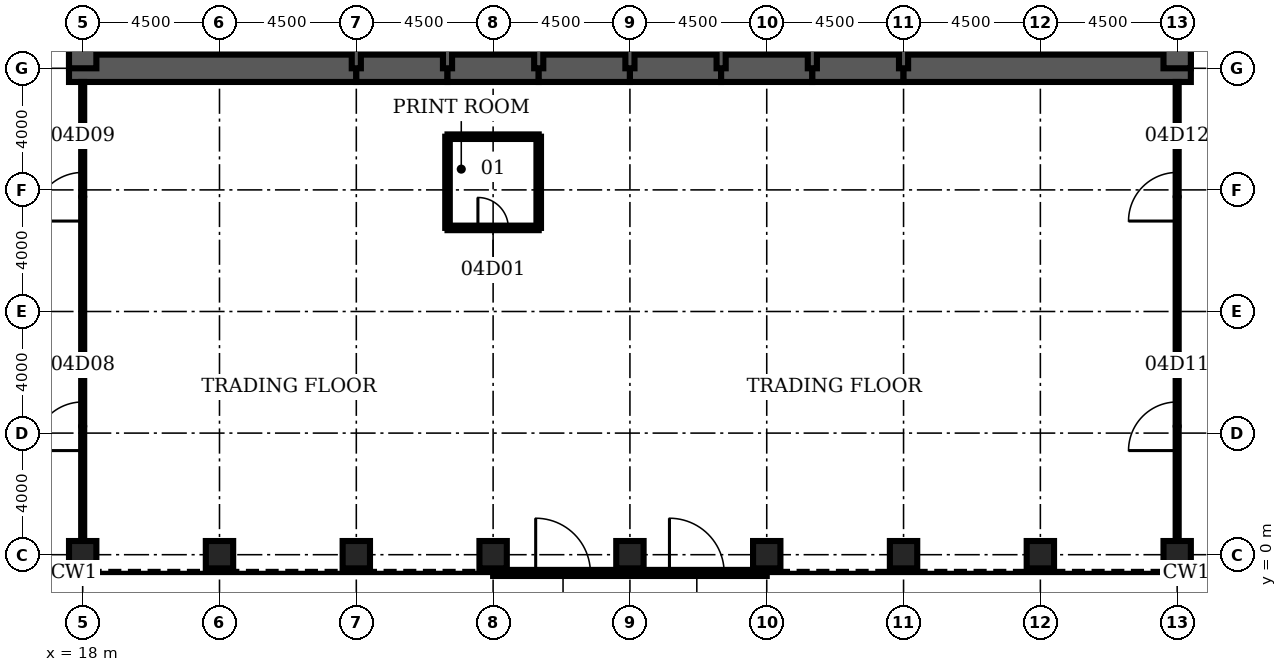
"""IFC4 building model, lengths in metres.
Left out: names, types, materials, properties, quantities, classifications, styles, units other than length and angle.
Written with IfcOpenShell. Run it as: python <this file> out.ifc"""

import sys

from ifc_helpers import new_model, si_unit, direction, frame, frame_2d, origin, origin_2d, place, context, subcontext, project, spatial, rectangle, hollow_rectangle, extrude, element, fill, save


model = new_model("IFC4")
c1 = context("Model", 3, precision=1e-05, world=origin(), true_north=direction((0.0, 1.0)))
c2 = subcontext(c1, "Body", "Model", "MODEL_VIEW")
j1 = project(units=[si_unit("LENGTHUNIT", "METRE"), si_unit("PLANEANGLEUNIT", "RADIAN")], contexts=[c1])
p1 = place(None, origin())
s1 = spatial("IfcSite", under=j1, at=p1, CompositionType="ELEMENT")
p2 = place(p1, origin())
s2 = spatial("IfcBuilding", under=s1, at=p2, CompositionType="ELEMENT")
p3 = place(p2, frame((0.0, 0.0, 23.0)))
s3 = spatial("IfcBuildingStorey", under=s2, at=p3, CompositionType="ELEMENT", Elevation=23.0)
for number, where, z_axis, x_axis in (
    (1, (18.0, 0.0, 0.0), (0.0, 0.0, 1.0), (0.0, 1.0, 0.0)),
    (2, (22.5, 0.0, 0.0), (0.0, 0.0, 1.0), (0.0, 1.0, 0.0)),
    (3, (27.0, 0.0, 0.0), (0.0, 0.0, 1.0), (0.0, 1.0, 0.0)),
    (4, (31.5, 0.0, 0.0), (0.0, 0.0, 1.0), (0.0, 1.0, 0.0)),
    (5, (36.0, 0.0, 0.0), (0.0, 0.0, 1.0), (0.0, 1.0, 0.0)),
    (6, (40.5, 0.0, 0.0), (0.0, 0.0, 1.0), (0.0, 1.0, 0.0)),
    (7, (45.0, 0.0, 0.0), (0.0, 0.0, 1.0), (0.0, 1.0, 0.0)),
    (8, (49.5, 0.0, 0.0), (0.0, 0.0, 1.0), (0.0, 1.0, 0.0)),
    (9, (54.0, 0.0, 0.0), (0.0, 0.0, 1.0), (0.0, 1.0, 0.0)),
):
    element("IfcColumn", number, at=place(p3, frame(where, z_axis=z_axis, x_axis=x_axis)), inside=s3, PredefinedType="COLUMN", context=c2, shape_type="SweptSolid", body=[
        extrude(hollow_rectangle(XDim=0.9, YDim=0.9, WallThickness=0.12, at=origin_2d()), origin(), (0.0, 0.0, 1.0), 4.5),
    ])
p4 = place(p3, frame((17.55, 16.0, 0.0), z_axis=(0.0, 0.0, 1.0), x_axis=(1.0, 0.0, 0.0)))
e10 = element("IfcWall", 10, at=p4, inside=s3, PredefinedType="SHEAR", context=c2, shape_type="SweptSolid", body=[
    extrude(rectangle(XDim=9.45, YDim=0.9, at=frame_2d((4.725, 0.0))), origin(), (0.0, 0.0, 1.0), 4.5),
])
for number, where, z_axis, x_axis in (
    (11, (27.0, 16.0, 0.0), (0.0, 0.0, 1.0), (1.0, 0.0, 0.0)),
    (12, (30.0, 16.0, 0.0), (0.0, 0.0, 1.0), (1.0, 0.0, 0.0)),
    (13, (33.0, 16.0, 0.0), (0.0, 0.0, 1.0), (1.0, 0.0, 0.0)),
    (14, (36.0, 16.0, 0.0), (0.0, 0.0, 1.0), (1.0, 0.0, 0.0)),
    (15, (39.0, 16.0, 0.0), (0.0, 0.0, 1.0), (1.0, 0.0, 0.0)),
    (16, (42.0, 16.0, 0.0), (0.0, 0.0, 1.0), (1.0, 0.0, 0.0)),
):
    element("IfcWall", number, at=place(p3, frame(where, z_axis=z_axis, x_axis=x_axis)), inside=s3, PredefinedType="SHEAR", context=c2, shape_type="SweptSolid", body=[
        extrude(rectangle(XDim=3.0, YDim=0.9, at=frame_2d((1.5, 0.0))), origin(), (0.0, 0.0, 1.0), 4.5),
    ])
p5 = place(p3, frame((45.0, 16.0, 0.0), z_axis=(0.0, 0.0, 1.0), x_axis=(1.0, 0.0, 0.0)))
e17 = element("IfcWall", 17, at=p5, inside=s3, PredefinedType="SHEAR", context=c2, shape_type="SweptSolid", body=[
    extrude(rectangle(XDim=9.45, YDim=0.9, at=frame_2d((4.725, 0.0))), origin(), (0.0, 0.0, 1.0), 4.5),
])
for number, where, z_axis, x_axis in (
    (18, (18.0, 19.2, 0.0), (0.0, 0.0, 1.0), (0.0, -1.0, 0.0)),
    (19, (54.0, 16.0, 0.0), (0.0, 0.0, 1.0), (0.0, 1.0, 0.0)),
):
    element("IfcWall", number, at=place(p3, frame(where, z_axis=z_axis, x_axis=x_axis)), inside=s3, PredefinedType="SHEAR", context=c2, shape_type="SweptSolid", body=[
        extrude(rectangle(XDim=3.2, YDim=0.9, at=frame_2d((1.6, 0.0))), origin(), (0.0, 0.0, 1.0), 4.5),
    ])
for number, where, z_axis, x_axis in (
    (20, (27.0, 16.0, 0.0), (0.0, 0.0, 1.0), (0.0, 1.0, 0.0)),
    (21, (30.0, 16.0, 0.0), (0.0, 0.0, 1.0), (0.0, 1.0, 0.0)),
    (22, (33.0, 16.0, 0.0), (0.0, 0.0, 1.0), (0.0, 1.0, 0.0)),
    (23, (36.0, 16.0, 0.0), (0.0, 0.0, 1.0), (0.0, 1.0, 0.0)),
    (24, (39.0, 16.0, 0.0), (0.0, 0.0, 1.0), (0.0, 1.0, 0.0)),
    (25, (42.0, 16.0, 0.0), (0.0, 0.0, 1.0), (0.0, 1.0, 0.0)),
    (26, (45.0, 16.0, 0.0), (0.0, 0.0, 1.0), (0.0, 1.0, 0.0)),
):
    element("IfcWall", number, at=place(p3, frame(where, z_axis=z_axis, x_axis=x_axis)), inside=s3, PredefinedType="SOLIDWALL", context=c2, shape_type="SweptSolid", body=[
        extrude(rectangle(XDim=3.2, YDim=0.3, at=frame_2d((1.6, 0.0))), origin(), (0.0, 0.0, 1.0), 4.5),
    ])
p6 = place(p3, frame((30.0, 10.75, 0.0), z_axis=(0.0, 0.0, 1.0), x_axis=(1.0, 0.0, 0.0)))
e27 = element("IfcWall", 27, at=p6, inside=s3, PredefinedType="PARTITIONING", context=c2, shape_type="SweptSolid", body=[
    extrude(rectangle(XDim=3.0, YDim=0.15, at=frame_2d((1.5, 0.0))), origin(), (0.0, 0.0, 1.0), 3.0),
])
p7 = place(p6, frame((1.0, 0.0, 0.0)))
e28 = element("IfcOpeningElement", 28, at=p7, cuts=e27, PredefinedType="OPENING", context=c2, shape_type="SweptSolid", body=[
    extrude(rectangle(XDim=1.0, YDim=2.1, at=frame_2d((0.5, 1.05))), frame((0.0, 0.085, 0.0), z_axis=(0.0, -1.0, 0.0), x_axis=(1.0, 0.0, 0.0)), (0.0, 0.0, 1.0), 0.17),
])
p8 = place(p3, frame((30.0, 13.75, 0.0), z_axis=(0.0, 0.0, 1.0), x_axis=(1.0, 0.0, 0.0)))
e29 = element("IfcWall", 29, at=p8, inside=s3, PredefinedType="PARTITIONING", context=c2, shape_type="SweptSolid", body=[
    extrude(rectangle(XDim=3.0, YDim=0.15, at=frame_2d((1.5, 0.0))), origin(), (0.0, 0.0, 1.0), 3.0),
])
p9 = place(p3, frame((18.0, 0.45, 0.0), z_axis=(0.0, 0.0, 1.0), x_axis=(0.0, 1.0, 0.0)))
e30 = element("IfcWall", 30, at=p9, inside=s3, PredefinedType="PARTITIONING", context=c2, shape_type="SweptSolid", body=[
    extrude(rectangle(XDim=15.1, YDim=0.1, at=frame_2d((7.55, 0.0))), origin(), (0.0, 0.0, 1.0), 3.0),
])
p10 = place(p9, frame((2.975, 0.0, 0.0)))
e31 = element("IfcOpeningElement", 31, at=p10, cuts=e30, PredefinedType="OPENING", context=c2, shape_type="SweptSolid", body=[
    extrude(rectangle(XDim=1.6, YDim=2.1, at=frame_2d((0.8, 1.05))), frame((0.0, 0.06, 0.0), z_axis=(0.0, -1.0, 0.0), x_axis=(1.0, 0.0, 0.0)), (0.0, 0.0, 1.0), 0.12),
])
p11 = place(p9, frame((10.525, 0.0, 0.0)))
e32 = element("IfcOpeningElement", 32, at=p11, cuts=e30, PredefinedType="OPENING", context=c2, shape_type="SweptSolid", body=[
    extrude(rectangle(XDim=1.6, YDim=2.1, at=frame_2d((0.8, 1.05))), frame((0.0, 0.06, 0.0), z_axis=(0.0, -1.0, 0.0), x_axis=(1.0, 0.0, 0.0)), (0.0, 0.0, 1.0), 0.12),
])
for number, where, z_axis, x_axis in (
    (33, (30.0, 10.75, 0.0), (0.0, 0.0, 1.0), (0.0, 1.0, 0.0)),
    (34, (33.0, 10.75, 0.0), (0.0, 0.0, 1.0), (0.0, 1.0, 0.0)),
):
    element("IfcWall", number, at=place(p3, frame(where, z_axis=z_axis, x_axis=x_axis)), inside=s3, PredefinedType="PARTITIONING", context=c2, shape_type="SweptSolid", body=[
        extrude(rectangle(XDim=3.0, YDim=0.15, at=frame_2d((1.5, 0.0))), origin(), (0.0, 0.0, 1.0), 3.0),
    ])
p12 = place(p3, frame((54.0, 0.45, 0.0), z_axis=(0.0, 0.0, 1.0), x_axis=(0.0, 1.0, 0.0)))
e35 = element("IfcWall", 35, at=p12, inside=s3, PredefinedType="PARTITIONING", context=c2, shape_type="SweptSolid", body=[
    extrude(rectangle(XDim=15.1, YDim=0.1, at=frame_2d((7.55, 0.0))), origin(), (0.0, 0.0, 1.0), 3.0),
])
p13 = place(p12, frame((2.975, 0.0, 0.0)))
e36 = element("IfcOpeningElement", 36, at=p13, cuts=e35, PredefinedType="OPENING", context=c2, shape_type="SweptSolid", body=[
    extrude(rectangle(XDim=1.6, YDim=2.1, at=frame_2d((0.8, 1.05))), frame((0.0, 0.06, 0.0), z_axis=(0.0, -1.0, 0.0), x_axis=(1.0, 0.0, 0.0)), (0.0, 0.0, 1.0), 0.12),
])
p14 = place(p12, frame((10.525, 0.0, 0.0)))
e37 = element("IfcOpeningElement", 37, at=p14, cuts=e35, PredefinedType="OPENING", context=c2, shape_type="SweptSolid", body=[
    extrude(rectangle(XDim=1.6, YDim=2.1, at=frame_2d((0.8, 1.05))), frame((0.0, 0.06, 0.0), z_axis=(0.0, -1.0, 0.0), x_axis=(1.0, 0.0, 0.0)), (0.0, 0.0, 1.0), 0.12),
])
p15 = place(p3, frame((31.5, -0.6, 0.0), z_axis=(0.0, 0.0, 1.0), x_axis=(1.0, 0.0, 0.0)))
e38 = element("IfcWall", 38, at=p15, inside=s3, PredefinedType="USERDEFINED", context=c2, shape_type="SweptSolid", body=[
    extrude(rectangle(XDim=9.0, YDim=0.2, at=frame_2d((4.5, 0.0))), origin(), (0.0, 0.0, 1.0), 4.32),
])
p16 = place(p15, frame((1.4, 0.0, 0.0)))
e39 = element("IfcOpeningElement", 39, at=p16, cuts=e38, PredefinedType="OPENING", context=c2, shape_type="SweptSolid", body=[
    extrude(rectangle(XDim=1.8, YDim=2.4, at=frame_2d((0.9, 1.2))), frame((0.0, 0.11, 0.0), z_axis=(0.0, -1.0, 0.0), x_axis=(1.0, 0.0, 0.0)), (0.0, 0.0, 1.0), 0.22),
])
p17 = place(p15, frame((5.8, 0.0, 0.0)))
e40 = element("IfcOpeningElement", 40, at=p17, cuts=e38, PredefinedType="OPENING", context=c2, shape_type="SweptSolid", body=[
    extrude(rectangle(XDim=1.8, YDim=2.4, at=frame_2d((0.9, 1.2))), frame((0.0, 0.11, 0.0), z_axis=(0.0, -1.0, 0.0), x_axis=(1.0, 0.0, 0.0)), (0.0, 0.0, 1.0), 0.22),
])
p18 = place(p7, origin())
e41 = element("IfcDoor", 41, at=p18, inside=s3, OperationType="SINGLE_SWING_LEFT", PredefinedType="DOOR", context=c2, shape_type="SweptSolid", body=[
    extrude(rectangle(XDim=1.0, YDim=2.1, at=frame_2d((0.5, 1.05))), frame((0.0, 0.025, 0.0), z_axis=(0.0, -1.0, 0.0), x_axis=(1.0, 0.0, 0.0)), (0.0, 0.0, 1.0), 0.05),
])
fill(e28, e41)
p19 = place(p10, origin())
e42 = element("IfcDoor", 42, at=p19, inside=s3, OperationType="SINGLE_SWING_LEFT", PredefinedType="DOOR", context=c2, shape_type="SweptSolid", body=[
    extrude(rectangle(XDim=1.6, YDim=2.1, at=frame_2d((0.8, 1.05))), frame((0.0, 0.025, 0.0), z_axis=(0.0, -1.0, 0.0), x_axis=(1.0, 0.0, 0.0)), (0.0, 0.0, 1.0), 0.05),
])
fill(e31, e42)
p20 = place(p11, origin())
e43 = element("IfcDoor", 43, at=p20, inside=s3, OperationType="SINGLE_SWING_LEFT", PredefinedType="DOOR", context=c2, shape_type="SweptSolid", body=[
    extrude(rectangle(XDim=1.6, YDim=2.1, at=frame_2d((0.8, 1.05))), frame((0.0, 0.025, 0.0), z_axis=(0.0, -1.0, 0.0), x_axis=(1.0, 0.0, 0.0)), (0.0, 0.0, 1.0), 0.05),
])
fill(e32, e43)
p21 = place(p13, origin())
e44 = element("IfcDoor", 44, at=p21, inside=s3, OperationType="SINGLE_SWING_LEFT", PredefinedType="DOOR", context=c2, shape_type="SweptSolid", body=[
    extrude(rectangle(XDim=1.6, YDim=2.1, at=frame_2d((0.8, 1.05))), frame((0.0, 0.025, 0.0), z_axis=(0.0, -1.0, 0.0), x_axis=(1.0, 0.0, 0.0)), (0.0, 0.0, 1.0), 0.05),
])
fill(e36, e44)
p22 = place(p14, origin())
e45 = element("IfcDoor", 45, at=p22, inside=s3, OperationType="SINGLE_SWING_LEFT", PredefinedType="DOOR", context=c2, shape_type="SweptSolid", body=[
    extrude(rectangle(XDim=1.6, YDim=2.1, at=frame_2d((0.8, 1.05))), frame((0.0, 0.025, 0.0), z_axis=(0.0, -1.0, 0.0), x_axis=(1.0, 0.0, 0.0)), (0.0, 0.0, 1.0), 0.05),
])
fill(e37, e45)
p23 = place(p16, origin())
e46 = element("IfcDoor", 46, at=p23, inside=s3, OperationType="SINGLE_SWING_LEFT", PredefinedType="DOOR", context=c2, shape_type="SweptSolid", body=[
    extrude(rectangle(XDim=1.8, YDim=2.4, at=frame_2d((0.9, 1.2))), frame((0.0, 0.025, 0.0), z_axis=(0.0, -1.0, 0.0), x_axis=(1.0, 0.0, 0.0)), (0.0, 0.0, 1.0), 0.05),
])
fill(e39, e46)
p24 = place(p17, origin())
e47 = element("IfcDoor", 47, at=p24, inside=s3, OperationType="SINGLE_SWING_LEFT", PredefinedType="DOOR", context=c2, shape_type="SweptSolid", body=[
    extrude(rectangle(XDim=1.8, YDim=2.4, at=frame_2d((0.9, 1.2))), frame((0.0, 0.025, 0.0), z_axis=(0.0, -1.0, 0.0), x_axis=(1.0, 0.0, 0.0)), (0.0, 0.0, 1.0), 0.05),
])
fill(e40, e47)
save(model, sys.argv[1])
